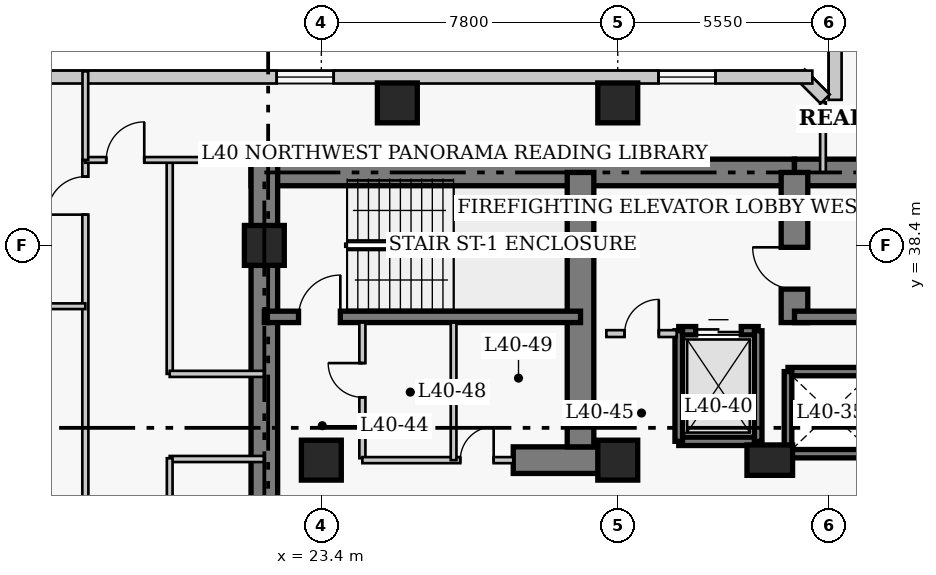
"""IFC4 building model, lengths in metres.
Left out: names, types, materials, properties, quantities, classifications, styles, units other than length and angle.
Written with IfcOpenShell. Run it as: python <this file> out.ifc"""

import sys

from ifc_helpers import new_model, si_unit, direction, frame, frame_2d, origin, origin_2d, place, context, subcontext, project, spatial, rectangle, extrude, element, fill, save


model = new_model("IFC4")
c1 = context("Model", 3, precision=1e-05, world=origin(), true_north=direction((0.0, 1.0)))
c2 = subcontext(c1, "Body", "Model", "MODEL_VIEW")
j1 = project(units=[si_unit("LENGTHUNIT", "METRE"), si_unit("PLANEANGLEUNIT", "RADIAN")], contexts=[c1])
p1 = place(None, origin())
s1 = spatial("IfcSite", under=j1, at=p1, CompositionType="ELEMENT")
p2 = place(p1, origin())
s2 = spatial("IfcBuilding", under=s1, at=p2, CompositionType="ELEMENT")
p3 = place(p2, frame((0.0, 0.0, 161.2)))
s3 = spatial("IfcBuildingStorey", under=s2, at=p3, CompositionType="ELEMENT", Elevation=161.2)
p4 = place(p3, frame((21.55, 40.32, 0.0), z_axis=(0.0, 0.0, 1.0), x_axis=(1.0, 0.0, 0.0)))
e1 = element("IfcWall", 1, at=p4, inside=s3, PredefinedType="SHEAR", context=c2, shape_type="SweptSolid", body=[
    extrude(rectangle(XDim=14.3, YDim=0.7, at=frame_2d((7.15, 0.0))), origin(), (0.0, 0.0, 1.0), 3.8),
])
p5 = place(p3, frame((35.85, 40.32, 0.0), z_axis=(0.0, 0.0, 1.0), x_axis=(1.0, 0.0, 0.0)))
e2 = element("IfcWall", 2, at=p5, inside=s3, PredefinedType="SHEAR", context=c2, shape_type="SweptSolid", body=[
    extrude(rectangle(XDim=12.6, YDim=0.7, at=frame_2d((6.3, 0.0))), origin(), (0.0, 0.0, 1.0), 3.8),
])
p6 = place(p3, frame((21.9, 27.05, 0.0), z_axis=(0.0, 0.0, 1.0), x_axis=(0.0, 1.0, 0.0)))
e3 = element("IfcWall", 3, at=p6, inside=s3, PredefinedType="SHEAR", context=c2, shape_type="SweptSolid", body=[
    extrude(rectangle(XDim=13.62, YDim=0.7, at=frame_2d((6.81, 0.0))), origin(), (0.0, 0.0, 1.0), 3.8),
])
p7 = place(p3, frame((28.45, 32.75, 0.0), z_axis=(0.0, 0.0, 1.0), x_axis=(1.0, 0.0, 0.0)))
e4 = element("IfcWall", 4, at=p7, inside=s3, PredefinedType="SHEAR", context=c2, shape_type="SweptSolid", body=[
    extrude(rectangle(XDim=2.4, YDim=0.7, at=frame_2d((1.2, 0.0))), origin(), (0.0, 0.0, 1.0), 3.8),
])
p8 = place(p3, frame((30.22, 33.1, 0.0), z_axis=(0.0, 0.0, 1.0), x_axis=(0.0, 1.0, 0.0)))
e5 = element("IfcWall", 5, at=p8, inside=s3, PredefinedType="SHEAR", context=c2, shape_type="SweptSolid", body=[
    extrude(rectangle(XDim=7.22, YDim=0.7, at=frame_2d((3.61, 0.0))), origin(), (0.0, 0.0, 1.0), 3.8),
])
p9 = place(p3, frame((35.85, 36.37, 0.0), z_axis=(0.0, 0.0, 1.0), x_axis=(0.0, 1.0, 0.0)))
e6 = element("IfcWall", 6, at=p9, inside=s3, PredefinedType="SHEAR", context=c2, shape_type="SweptSolid", body=[
    extrude(rectangle(XDim=3.95, YDim=0.7, at=frame_2d((1.975, 0.0))), origin(), (0.0, 0.0, 1.0), 3.8),
])
p10 = place(p9, frame((0.88, 0.0, 0.0)))
e7 = element("IfcOpeningElement", 7, at=p10, cuts=e6, PredefinedType="OPENING", context=c2, shape_type="SweptSolid", body=[
    extrude(rectangle(XDim=1.1, YDim=2.15, at=frame_2d((0.55, 1.075))), frame((0.0, 0.36, 0.0), z_axis=(0.0, -1.0, 0.0), x_axis=(1.0, 0.0, 0.0)), (0.0, 0.0, 1.0), 0.72),
])
p11 = place(p3, frame((21.9, 36.52, 0.0), z_axis=(0.0, 0.0, 1.0), x_axis=(1.0, 0.0, 0.0)))
e8 = element("IfcWall", 8, at=p11, inside=s3, PredefinedType="SHEAR", context=c2, shape_type="SweptSolid", body=[
    extrude(rectangle(XDim=8.32, YDim=0.3, at=frame_2d((4.16, 0.0))), origin(), (0.0, 0.0, 1.0), 3.8),
])
p12 = place(p11, frame((0.9, 0.0, 0.0)))
e9 = element("IfcOpeningElement", 9, at=p12, cuts=e8, PredefinedType="OPENING", context=c2, shape_type="SweptSolid", body=[
    extrude(rectangle(XDim=1.1, YDim=2.15, at=frame_2d((0.55, 1.075))), frame((0.0, 0.16, 0.0), z_axis=(0.0, -1.0, 0.0), x_axis=(1.0, 0.0, 0.0)), (0.0, 0.0, 1.0), 0.32),
])
p13 = place(p3, frame((35.85, 36.52, 0.0), z_axis=(0.0, 0.0, 1.0), x_axis=(1.0, 0.0, 0.0)))
e10 = element("IfcWall", 10, at=p13, inside=s3, PredefinedType="SHEAR", context=c2, shape_type="SweptSolid", body=[
    extrude(rectangle(XDim=8.33, YDim=0.3, at=frame_2d((4.165, 0.0))), origin(), (0.0, 0.0, 1.0), 3.8),
])
for number, where, z_axis, x_axis in (
    (11, (21.9, 38.4, 0.0), (0.0, 0.0, 1.0), (1.0, 0.0, 0.0)),
    (12, (23.4, 32.75, 0.0), (0.0, 0.0, 1.0), (1.0, 0.0, 0.0)),
    (13, (31.2, 32.75, 0.0), (0.0, 0.0, 1.0), (1.0, 0.0, 0.0)),
):
    element("IfcColumn", number, at=place(p3, frame(where, z_axis=z_axis, x_axis=x_axis)), inside=s3, PredefinedType="COLUMN", context=c2, shape_type="SweptSolid", body=[
        extrude(rectangle(XDim=1.05, YDim=1.05, at=origin_2d()), origin(), (0.0, 0.0, 1.0), 3.8),
    ])
p14 = place(p3, frame((35.2, 32.75, 0.0), z_axis=(0.0, 0.0, 1.0), x_axis=(1.0, 0.0, 0.0)))
e14 = element("IfcColumn", 14, at=p14, inside=s3, PredefinedType="COLUMN", context=c2, shape_type="SweptSolid", body=[
    extrude(rectangle(XDim=1.2, YDim=0.8, at=origin_2d()), origin(), (0.0, 0.0, 1.0), 3.8),
])
for number, where, z_axis, x_axis in (
    (15, (25.4, 42.15, 0.0), (0.0, 0.0, 1.0), (1.0, 0.0, 0.0)),
    (16, (31.2, 42.15, 0.0), (0.0, 0.0, 1.0), (1.0, 0.0, 0.0)),
):
    element("IfcColumn", number, at=place(p3, frame(where, z_axis=z_axis, x_axis=x_axis)), inside=s3, PredefinedType="COLUMN", context=c2, shape_type="SweptSolid", body=[
        extrude(rectangle(XDim=1.05, YDim=1.05, at=origin_2d()), origin(), (0.0, 0.0, 1.0), 3.8),
    ])
p15 = place(p3, frame((36.92, 44.37, 0.0), z_axis=(0.0, 0.0, 1.0), x_axis=(0.0, -1.0, 0.0)))
e17 = element("IfcWall", 17, at=p15, inside=s3, PredefinedType="SOLIDWALL", context=c2, shape_type="SweptSolid", body=[
    extrude(rectangle(XDim=2.14, YDim=0.34, at=frame_2d((1.07, 0.0))), origin(), (0.0, 0.0, 1.0), 3.55),
])
p16 = place(p3, frame((36.658, 42.251, 0.0), z_axis=(0.0, 0.0, 1.0), x_axis=(-0.707106781187, 0.707106781187, 0.0)))
e18 = element("IfcWall", 18, at=p16, inside=s3, PredefinedType="SOLIDWALL", context=c2, shape_type="SweptSolid", body=[
    extrude(rectangle(XDim=0.929, YDim=0.34, at=frame_2d((0.464, 0.0))), origin(), (0.0, 0.0, 1.0), 3.55),
])
p17 = place(p3, frame((36.32, 42.83, 0.0), z_axis=(0.0, 0.0, 1.0), x_axis=(-1.0, 0.0, 0.0)))
e19 = element("IfcWall", 19, at=p17, inside=s3, PredefinedType="SOLIDWALL", context=c2, shape_type="SweptSolid", body=[
    extrude(rectangle(XDim=26.69, YDim=0.34, at=frame_2d((13.345, 0.0))), origin(), (0.0, 0.0, 1.0), 3.55),
])
p18 = place(p17, frame((2.548, 0.0, 0.85)))
e20 = element("IfcOpeningElement", 20, at=p18, cuts=e19, PredefinedType="OPENING", context=c2, shape_type="SweptSolid", body=[
    extrude(rectangle(XDim=1.5, YDim=1.75, at=frame_2d((0.75, 0.875))), frame((0.0, 0.18, 0.0), z_axis=(0.0, -1.0, 0.0), x_axis=(1.0, 0.0, 0.0)), (0.0, 0.0, 1.0), 0.36),
])
p19 = place(p17, frame((12.595, 0.0, 0.85)))
e21 = element("IfcOpeningElement", 21, at=p19, cuts=e19, PredefinedType="OPENING", context=c2, shape_type="SweptSolid", body=[
    extrude(rectangle(XDim=1.5, YDim=1.75, at=frame_2d((0.75, 0.875))), frame((0.0, 0.18, 0.0), z_axis=(0.0, -1.0, 0.0), x_axis=(1.0, 0.0, 0.0)), (0.0, 0.0, 1.0), 0.36),
])
p20 = place(p17, frame((21.492, 0.0, 0.85)))
e22 = element("IfcOpeningElement", 22, at=p20, cuts=e19, PredefinedType="OPENING", context=c2, shape_type="SweptSolid", body=[
    extrude(rectangle(XDim=1.5, YDim=1.75, at=frame_2d((0.75, 0.875))), frame((0.0, 0.18, 0.0), z_axis=(0.0, -1.0, 0.0), x_axis=(1.0, 0.0, 0.0)), (0.0, 0.0, 1.0), 0.36),
])
for number, where, z_axis, x_axis in (
    (23, (35.68, 35.08, 0.0), (0.0, 0.0, 1.0), (1.0, 0.0, 0.0)),
    (24, (35.68, 32.92, 0.0), (0.0, 0.0, 1.0), (1.0, 0.0, 0.0)),
):
    element("IfcWall", number, at=place(p3, frame(where, z_axis=z_axis, x_axis=x_axis)), inside=s3, PredefinedType="SHEAR", context=c2, shape_type="SweptSolid", body=[
        extrude(rectangle(XDim=2.32, YDim=0.22, at=frame_2d((1.16, 0.0))), origin(), (0.0, 0.0, 1.0), 3.8),
    ])
p21 = place(p3, frame((35.68, 32.92, 0.0), z_axis=(0.0, 0.0, 1.0), x_axis=(0.0, 1.0, 0.0)))
e25 = element("IfcWall", 25, at=p21, inside=s3, PredefinedType="SHEAR", context=c2, shape_type="SweptSolid", body=[
    extrude(rectangle(XDim=2.16, YDim=0.2, at=frame_2d((1.08, 0.0))), origin(), (0.0, 0.0, 1.0), 3.8),
])
p22 = place(p3, frame((32.805, 36.155, 0.0), z_axis=(0.0, 0.0, 1.0), x_axis=(1.0, 0.0, 0.0)))
e26 = element("IfcWall", 26, at=p22, inside=s3, PredefinedType="SHEAR", context=c2, shape_type="SweptSolid", body=[
    extrude(rectangle(XDim=2.09, YDim=0.22, at=frame_2d((1.045, 0.0))), origin(), (0.0, 0.0, 1.0), 3.8),
])
p23 = place(p22, frame((0.445, 0.0, 0.0)))
e27 = element("IfcOpeningElement", 27, at=p23, cuts=e26, PredefinedType="OPENING", context=c2, shape_type="SweptSolid", body=[
    extrude(rectangle(XDim=1.2, YDim=2.15, at=frame_2d((0.6, 1.075))), frame((0.0, 0.12, 0.0), z_axis=(0.0, -1.0, 0.0), x_axis=(1.0, 0.0, 0.0)), (0.0, 0.0, 1.0), 0.24),
])
p24 = place(p3, frame((32.805, 33.245, 0.0), z_axis=(0.0, 0.0, 1.0), x_axis=(1.0, 0.0, 0.0)))
e28 = element("IfcWall", 28, at=p24, inside=s3, PredefinedType="SHEAR", context=c2, shape_type="SweptSolid", body=[
    extrude(rectangle(XDim=2.09, YDim=0.22, at=frame_2d((1.045, 0.0))), origin(), (0.0, 0.0, 1.0), 3.8),
])
for number, where, z_axis, x_axis in (
    (29, (32.805, 33.245, 0.0), (0.0, 0.0, 1.0), (0.0, 1.0, 0.0)),
    (30, (34.895, 33.245, 0.0), (0.0, 0.0, 1.0), (0.0, 1.0, 0.0)),
):
    element("IfcWall", number, at=place(p3, frame(where, z_axis=z_axis, x_axis=x_axis)), inside=s3, PredefinedType="SHEAR", context=c2, shape_type="SweptSolid", body=[
        extrude(rectangle(XDim=2.91, YDim=0.2, at=frame_2d((1.455, 0.0))), origin(), (0.0, 0.0, 1.0), 3.8),
    ])
p25 = place(p3, frame((30.9, 36.08, 0.0), z_axis=(0.0, 0.0, 1.0), x_axis=(1.0, 0.0, 0.0)))
e31 = element("IfcWall", 31, at=p25, inside=s3, PredefinedType="PARTITIONING", context=c2, shape_type="SweptSolid", body=[
    extrude(rectangle(XDim=1.85, YDim=0.18, at=frame_2d((0.925, 0.0))), origin(), (0.0, 0.0, 1.0), 3.55),
])
p26 = place(p25, frame((0.48, 0.0, 0.0)))
e32 = element("IfcOpeningElement", 32, at=p26, cuts=e31, PredefinedType="OPENING", context=c2, shape_type="SweptSolid", body=[
    extrude(rectangle(XDim=0.9, YDim=2.15, at=frame_2d((0.45, 1.075))), frame((0.0, 0.1, 0.0), z_axis=(0.0, -1.0, 0.0), x_axis=(1.0, 0.0, 0.0)), (0.0, 0.0, 1.0), 0.2),
])
p27 = place(p3, frame((24.48, 32.8, 0.0), z_axis=(0.0, 0.0, 1.0), x_axis=(0.0, 1.0, 0.0)))
e33 = element("IfcWall", 33, at=p27, inside=s3, PredefinedType="PARTITIONING", context=c2, shape_type="SweptSolid", body=[
    extrude(rectangle(XDim=3.57, YDim=0.16, at=frame_2d((1.785, 0.0))), origin(), (0.0, 0.0, 1.0), 3.55),
])
p28 = place(p27, frame((1.604, 0.0, 0.0)))
e34 = element("IfcOpeningElement", 34, at=p28, cuts=e33, PredefinedType="OPENING", context=c2, shape_type="SweptSolid", body=[
    extrude(rectangle(XDim=0.9, YDim=2.1, at=frame_2d((0.45, 1.05))), frame((0.0, 0.09, 0.0), z_axis=(0.0, -1.0, 0.0), x_axis=(1.0, 0.0, 0.0)), (0.0, 0.0, 1.0), 0.18),
])
p29 = place(p3, frame((24.48, 32.75, 0.0), z_axis=(0.0, 0.0, 1.0), x_axis=(1.0, 0.0, 0.0)))
e35 = element("IfcWall", 35, at=p29, inside=s3, PredefinedType="PARTITIONING", context=c2, shape_type="SweptSolid", body=[
    extrude(rectangle(XDim=3.97, YDim=0.16, at=frame_2d((1.985, 0.0))), origin(), (0.0, 0.0, 1.0), 3.55),
])
p30 = place(p29, frame((2.575, 0.0, 0.0)))
e36 = element("IfcOpeningElement", 36, at=p30, cuts=e35, PredefinedType="OPENING", context=c2, shape_type="SweptSolid", body=[
    extrude(rectangle(XDim=0.88, YDim=2.05, at=frame_2d((0.44, 1.025))), frame((0.0, 0.09, 0.0), z_axis=(0.0, -1.0, 0.0), x_axis=(1.0, 0.0, 0.0)), (0.0, 0.0, 1.0), 0.18),
])
p31 = place(p3, frame((26.88, 32.75, 0.0), z_axis=(0.0, 0.0, 1.0), x_axis=(0.0, 1.0, 0.0)))
e37 = element("IfcWall", 37, at=p31, inside=s3, PredefinedType="PARTITIONING", context=c2, shape_type="SweptSolid", body=[
    extrude(rectangle(XDim=3.62, YDim=0.15, at=frame_2d((1.81, 0.0))), origin(), (0.0, 0.0, 1.0), 3.55),
])
p32 = place(p3, frame((17.19, 6.85, 0.0), z_axis=(0.0, 0.0, 1.0), x_axis=(0.0, 1.0, 0.0)))
e38 = element("IfcWall", 38, at=p32, inside=s3, PredefinedType="PARTITIONING", context=c2, shape_type="SweptSolid", body=[
    extrude(rectangle(XDim=33.8, YDim=0.16, at=frame_2d((16.9, 0.0))), origin(), (0.0, 0.0, 1.0), 3.55),
])
p33 = place(p32, frame((1.7, 0.0, 0.0)))
e39 = element("IfcOpeningElement", 39, at=p33, cuts=e38, PredefinedType="OPENING", context=c2, shape_type="SweptSolid", body=[
    extrude(rectangle(XDim=0.95, YDim=2.1, at=frame_2d((0.475, 1.05))), frame((0.0, 0.09, 0.0), z_axis=(0.0, -1.0, 0.0), x_axis=(1.0, 0.0, 0.0)), (0.0, 0.0, 1.0), 0.18),
])
p34 = place(p32, frame((8.275, 0.0, 0.0)))
e40 = element("IfcOpeningElement", 40, at=p34, cuts=e38, PredefinedType="OPENING", context=c2, shape_type="SweptSolid", body=[
    extrude(rectangle(XDim=0.95, YDim=2.1, at=frame_2d((0.475, 1.05))), frame((0.0, 0.09, 0.0), z_axis=(0.0, -1.0, 0.0), x_axis=(1.0, 0.0, 0.0)), (0.0, 0.0, 1.0), 0.18),
])
p35 = place(p32, frame((14.543, 0.0, 0.0)))
e41 = element("IfcOpeningElement", 41, at=p35, cuts=e38, PredefinedType="OPENING", context=c2, shape_type="SweptSolid", body=[
    extrude(rectangle(XDim=0.95, YDim=2.1, at=frame_2d((0.475, 1.05))), frame((0.0, 0.09, 0.0), z_axis=(0.0, -1.0, 0.0), x_axis=(1.0, 0.0, 0.0)), (0.0, 0.0, 1.0), 0.18),
])
p36 = place(p32, frame((32.36, 0.0, 0.0)))
e42 = element("IfcOpeningElement", 42, at=p36, cuts=e38, PredefinedType="OPENING", context=c2, shape_type="SweptSolid", body=[
    extrude(rectangle(XDim=1.0, YDim=2.15, at=frame_2d((0.5, 1.075))), frame((0.0, 0.09, 0.0), z_axis=(0.0, -1.0, 0.0), x_axis=(1.0, 0.0, 0.0)), (0.0, 0.0, 1.0), 0.18),
])
p37 = place(p3, frame((19.41, 35.02, 0.0), z_axis=(0.0, 0.0, 1.0), x_axis=(0.0, 1.0, 0.0)))
e43 = element("IfcWall", 43, at=p37, inside=s3, PredefinedType="PARTITIONING", context=c2, shape_type="SweptSolid", body=[
    extrude(rectangle(XDim=5.63, YDim=0.16, at=frame_2d((2.815, 0.0))), origin(), (0.0, 0.0, 1.0), 3.55),
])
for number, where, z_axis, x_axis in (
    (44, (19.41, 35.02, 0.0), (0.0, 0.0, 1.0), (1.0, 0.0, 0.0)),
    (45, (19.41, 32.78, 0.0), (0.0, 0.0, 1.0), (1.0, 0.0, 0.0)),
):
    element("IfcWall", number, at=place(p3, frame(where, z_axis=z_axis, x_axis=x_axis)), inside=s3, PredefinedType="PARTITIONING", context=c2, shape_type="SweptSolid", body=[
        extrude(rectangle(XDim=2.49, YDim=0.16, at=frame_2d((1.245, 0.0))), origin(), (0.0, 0.0, 1.0), 3.55),
    ])
p38 = place(p3, frame((17.19, 40.65, 0.0), z_axis=(0.0, 0.0, 1.0), x_axis=(1.0, 0.0, 0.0)))
e46 = element("IfcWall", 46, at=p38, inside=s3, PredefinedType="PARTITIONING", context=c2, shape_type="SweptSolid", body=[
    extrude(rectangle(XDim=4.91, YDim=0.15, at=frame_2d((2.455, 0.0))), origin(), (0.0, 0.0, 1.0), 3.55),
])
p39 = place(p38, frame((0.55, 0.0, 0.0)))
e47 = element("IfcOpeningElement", 47, at=p39, cuts=e46, PredefinedType="OPENING", context=c2, shape_type="SweptSolid", body=[
    extrude(rectangle(XDim=1.0, YDim=2.15, at=frame_2d((0.5, 1.075))), frame((0.0, 0.085, 0.0), z_axis=(0.0, -1.0, 0.0), x_axis=(1.0, 0.0, 0.0)), (0.0, 0.0, 1.0), 0.17),
])
p40 = place(p3, frame((19.41, 16.51, 0.0), z_axis=(0.0, 0.0, 1.0), x_axis=(0.0, 1.0, 0.0)))
e48 = element("IfcWall", 48, at=p40, inside=s3, PredefinedType="PARTITIONING", context=c2, shape_type="SweptSolid", body=[
    extrude(rectangle(XDim=16.29, YDim=0.15, at=frame_2d((8.145, 0.0))), origin(), (0.0, 0.0, 1.0), 3.093),
])
p41 = place(p3, frame((17.19, 40.65, 0.0), z_axis=(0.0, 0.0, 1.0), x_axis=(0.0, 1.0, 0.0)))
e49 = element("IfcWall", 49, at=p41, inside=s3, PredefinedType="PARTITIONING", context=c2, shape_type="SweptSolid", body=[
    extrude(rectangle(XDim=2.33, YDim=0.15, at=frame_2d((1.165, 0.0))), origin(), (0.0, 0.0, 1.0), 3.55),
])
p42 = place(p3, frame((36.6, 40.32, 0.0), z_axis=(0.0, 0.0, 1.0), x_axis=(0.0, 1.0, 0.0)))
e50 = element("IfcWall", 50, at=p42, inside=s3, PredefinedType="PARTITIONING", context=c2, shape_type="SweptSolid", body=[
    extrude(rectangle(XDim=1.845, YDim=0.15, at=frame_2d((0.922, 0.0))), origin(), (0.0, 0.0, 1.0), 3.55),
])
p43 = place(p3, frame((14.45, 36.8, 0.0), z_axis=(0.0, 0.0, 1.0), x_axis=(1.0, 0.0, 0.0)))
e51 = element("IfcWall", 51, at=p43, inside=s3, PredefinedType="PARTITIONING", context=c2, shape_type="SweptSolid", body=[
    extrude(rectangle(XDim=2.74, YDim=0.15, at=frame_2d((1.37, 0.0))), origin(), (0.0, 0.0, 1.0), 3.55),
])
p44 = place(p18, origin())
e52 = element("IfcWindow", 52, at=p44, inside=s3, PartitioningType="SINGLE_PANEL", PredefinedType="WINDOW", context=c2, shape_type="SweptSolid", body=[
    extrude(rectangle(XDim=1.5, YDim=1.75, at=frame_2d((0.75, 0.875))), frame((0.0, 0.03, 0.0), z_axis=(0.0, -1.0, 0.0), x_axis=(1.0, 0.0, 0.0)), (0.0, 0.0, 1.0), 0.06),
])
fill(e20, e52)
p45 = place(p19, origin())
e53 = element("IfcWindow", 53, at=p45, inside=s3, PartitioningType="SINGLE_PANEL", PredefinedType="WINDOW", context=c2, shape_type="SweptSolid", body=[
    extrude(rectangle(XDim=1.5, YDim=1.75, at=frame_2d((0.75, 0.875))), frame((0.0, 0.03, 0.0), z_axis=(0.0, -1.0, 0.0), x_axis=(1.0, 0.0, 0.0)), (0.0, 0.0, 1.0), 0.06),
])
fill(e21, e53)
p46 = place(p23, origin())
e54 = element("IfcDoor", 54, at=p46, inside=s3, OperationType="DOUBLE_DOOR_SLIDING", PredefinedType="DOOR", context=c2, shape_type="SweptSolid", body=[
    extrude(rectangle(XDim=1.2, YDim=2.15, at=frame_2d((0.6, 1.075))), frame((0.0, 0.025, 0.0), z_axis=(0.0, -1.0, 0.0), x_axis=(1.0, 0.0, 0.0)), (0.0, 0.0, 1.0), 0.05),
])
fill(e27, e54)
p47 = place(p26, origin())
e55 = element("IfcDoor", 55, at=p47, inside=s3, OperationType="SINGLE_SWING_RIGHT", PredefinedType="DOOR", context=c2, shape_type="SweptSolid", body=[
    extrude(rectangle(XDim=0.9, YDim=2.15, at=frame_2d((0.45, 1.075))), frame((0.0, 0.025, 0.0), z_axis=(0.0, -1.0, 0.0), x_axis=(1.0, 0.0, 0.0)), (0.0, 0.0, 1.0), 0.05),
])
fill(e32, e55)
p48 = place(p28, origin())
e56 = element("IfcDoor", 56, at=p48, inside=s3, OperationType="SINGLE_SWING_RIGHT", PredefinedType="DOOR", context=c2, shape_type="SweptSolid", body=[
    extrude(rectangle(XDim=0.9, YDim=2.1, at=frame_2d((0.45, 1.05))), frame((0.0, 0.025, 0.0), z_axis=(0.0, -1.0, 0.0), x_axis=(1.0, 0.0, 0.0)), (0.0, 0.0, 1.0), 0.05),
])
fill(e34, e56)
p49 = place(p30, origin())
e57 = element("IfcDoor", 57, at=p49, inside=s3, OperationType="SINGLE_SWING_RIGHT", PredefinedType="DOOR", context=c2, shape_type="SweptSolid", body=[
    extrude(rectangle(XDim=0.88, YDim=2.05, at=frame_2d((0.44, 1.025))), frame((0.0, 0.025, 0.0), z_axis=(0.0, -1.0, 0.0), x_axis=(1.0, 0.0, 0.0)), (0.0, 0.0, 1.0), 0.05),
])
fill(e36, e57)
p50 = place(p39, origin())
e58 = element("IfcDoor", 58, at=p50, inside=s3, OperationType="SINGLE_SWING_RIGHT", PredefinedType="DOOR", context=c2, shape_type="SweptSolid", body=[
    extrude(rectangle(XDim=1.0, YDim=2.15, at=frame_2d((0.5, 1.075))), frame((0.0, 0.025, 0.0), z_axis=(0.0, -1.0, 0.0), x_axis=(1.0, 0.0, 0.0)), (0.0, 0.0, 1.0), 0.05),
])
fill(e47, e58)
p51 = place(p36, origin())
e59 = element("IfcDoor", 59, at=p51, inside=s3, OperationType="SINGLE_SWING_LEFT", PredefinedType="DOOR", context=c2, shape_type="SweptSolid", body=[
    extrude(rectangle(XDim=1.0, YDim=2.15, at=frame_2d((0.5, 1.075))), frame((0.0, 0.025, 0.0), z_axis=(0.0, -1.0, 0.0), x_axis=(1.0, 0.0, 0.0)), (0.0, 0.0, 1.0), 0.05),
])
fill(e42, e59)
p52 = place(p12, origin())
e60 = element("IfcDoor", 60, at=p52, inside=s3, OperationType="SINGLE_SWING_RIGHT", PredefinedType="DOOR", context=c2, shape_type="SweptSolid", body=[
    extrude(rectangle(XDim=1.1, YDim=2.15, at=frame_2d((0.55, 1.075))), frame((0.0, 0.025, 0.0), z_axis=(0.0, -1.0, 0.0), x_axis=(1.0, 0.0, 0.0)), (0.0, 0.0, 1.0), 0.05),
])
fill(e9, e60)
p53 = place(p10, origin())
e61 = element("IfcDoor", 61, at=p53, inside=s3, OperationType="SINGLE_SWING_RIGHT", PredefinedType="DOOR", context=c2, shape_type="SweptSolid", body=[
    extrude(rectangle(XDim=1.1, YDim=2.15, at=frame_2d((0.55, 1.075))), frame((0.0, 0.025, 0.0), z_axis=(0.0, -1.0, 0.0), x_axis=(1.0, 0.0, 0.0)), (0.0, 0.0, 1.0), 0.05),
])
fill(e7, e61)
save(model, sys.argv[1])
